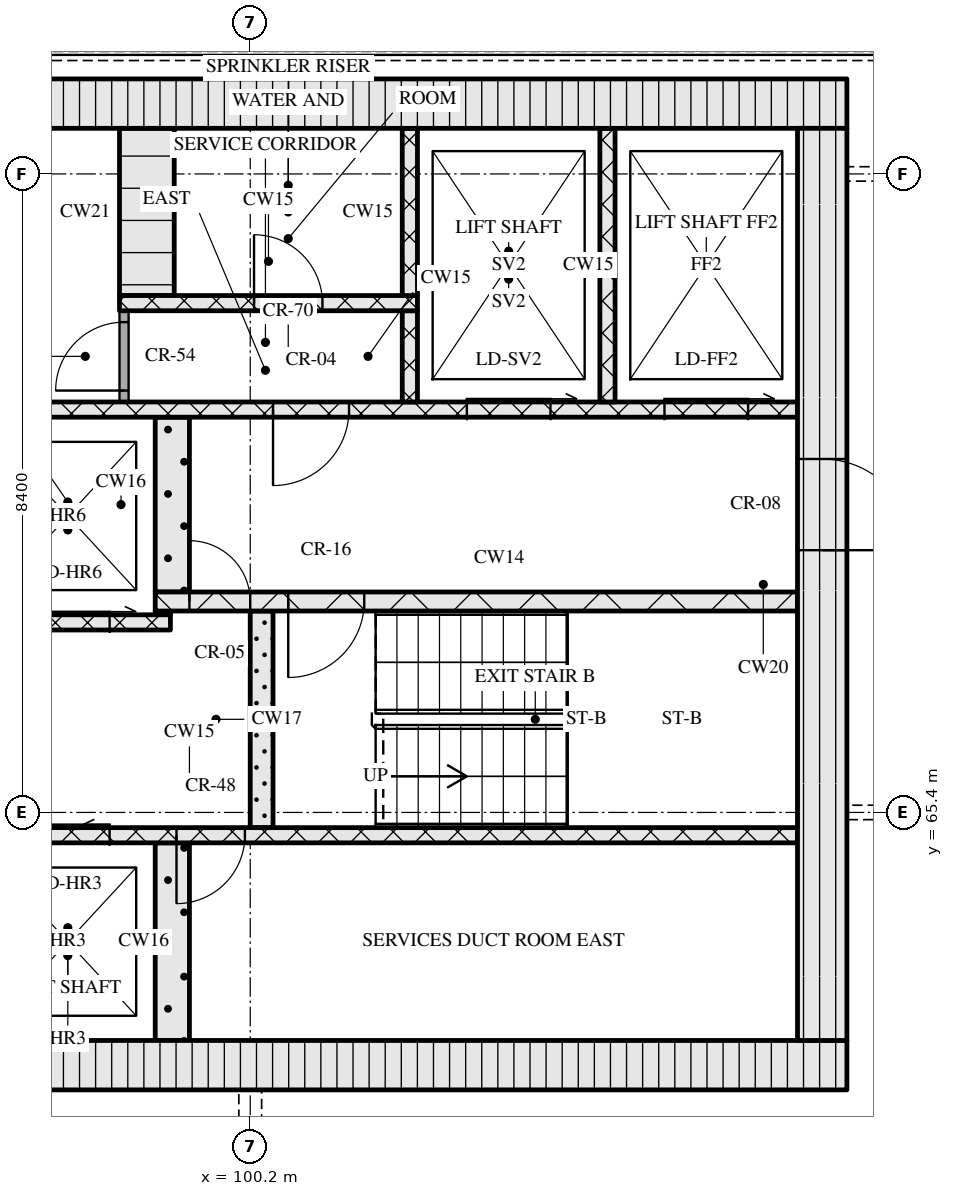
"""IFC4 building model, lengths in metres.
Left out: names, types, materials, properties, quantities, classifications, styles, units other than length and angle.
Written with IfcOpenShell. Run it as: python <this file> out.ifc"""

import sys

from ifc_helpers import new_model, si_unit, direction, frame, frame_2d, origin, place, context, subcontext, project, spatial, rectangle, extrude, element, fill, save


model = new_model("IFC4")
c1 = context("Model", 3, precision=1e-05, world=origin(), true_north=direction((0.0, 1.0)))
c2 = subcontext(c1, "Body", "Model", "MODEL_VIEW")
j1 = project(units=[si_unit("LENGTHUNIT", "METRE"), si_unit("PLANEANGLEUNIT", "RADIAN")], contexts=[c1])
p1 = place(None, origin())
s1 = spatial("IfcSite", under=j1, at=p1, CompositionType="ELEMENT")
p2 = place(p1, origin())
s2 = spatial("IfcBuilding", under=s1, at=p2, CompositionType="ELEMENT")
p3 = place(p2, frame((0.0, 0.0, 245.1)))
s3 = spatial("IfcBuildingStorey", under=s2, at=p3, CompositionType="ELEMENT", Elevation=245.1)
p4 = place(p3, frame((67.15, 62.075, 0.0), z_axis=(0.0, 0.0, 1.0), x_axis=(1.0, 0.0, 0.0)))
e1 = element("IfcWall", 1, at=p4, inside=s3, PredefinedType="SOLIDWALL", context=c2, shape_type="SweptSolid", body=[
    extrude(rectangle(XDim=40.9, YDim=0.65, at=frame_2d((20.45, 0.0))), origin(), (0.0, 0.0, 1.0), 3.32),
])
p5 = place(p4, frame((20.8, 0.0, 0.0)))
e2 = element("IfcOpeningElement", 2, at=p5, cuts=e1, PredefinedType="OPENING", context=c2, shape_type="SweptSolid", body=[
    extrude(rectangle(XDim=1.8, YDim=2.1, at=frame_2d((0.9, 1.05))), frame((0.0, 0.335, 0.0), z_axis=(0.0, -1.0, 0.0), x_axis=(1.0, 0.0, 0.0)), (0.0, 0.0, 1.0), 0.67),
])
p6 = place(p3, frame((67.15, 74.725, 0.0), z_axis=(0.0, 0.0, 1.0), x_axis=(1.0, 0.0, 0.0)))
e3 = element("IfcWall", 3, at=p6, inside=s3, PredefinedType="SOLIDWALL", context=c2, shape_type="SweptSolid", body=[
    extrude(rectangle(XDim=40.9, YDim=0.65, at=frame_2d((20.45, 0.0))), origin(), (0.0, 0.0, 1.0), 3.32),
])
p7 = place(p3, frame((107.725, 62.4, 0.0), z_axis=(0.0, 0.0, 1.0), x_axis=(0.0, 1.0, 0.0)))
e4 = element("IfcWall", 4, at=p7, inside=s3, PredefinedType="SOLIDWALL", context=c2, shape_type="SweptSolid", body=[
    extrude(rectangle(XDim=12.0, YDim=0.65, at=frame_2d((6.0, 0.0))), origin(), (0.0, 0.0, 1.0), 3.32),
])
p8 = place(p7, frame((6.45, 0.0, 0.0)))
e5 = element("IfcOpeningElement", 5, at=p8, cuts=e4, PredefinedType="OPENING", context=c2, shape_type="SweptSolid", body=[
    extrude(rectangle(XDim=1.2, YDim=2.1, at=frame_2d((0.6, 1.05))), frame((0.0, 0.335, 0.0), z_axis=(0.0, -1.0, 0.0), x_axis=(1.0, 0.0, 0.0)), (0.0, 0.0, 1.0), 0.67),
])
p9 = place(p3, frame((99.175, 62.4, 0.0), z_axis=(0.0, 0.0, 1.0), x_axis=(0.0, 1.0, 0.0)))
e6 = element("IfcWall", 6, at=p9, inside=s3, PredefinedType="SOLIDWALL", context=c2, shape_type="SweptSolid", body=[
    extrude(rectangle(XDim=2.6, YDim=0.45, at=frame_2d((1.3, 0.0))), origin(), (0.0, 0.0, 1.0), 3.32),
])
p10 = place(p3, frame((91.4, 65.1, 0.0), z_axis=(0.0, 0.0, 1.0), x_axis=(1.0, 0.0, 0.0)))
e7 = element("IfcWall", 7, at=p10, inside=s3, PredefinedType="SOLIDWALL", context=c2, shape_type="SweptSolid", body=[
    extrude(rectangle(XDim=16.0, YDim=0.2, at=frame_2d((8.0, 0.0))), origin(), (0.0, 0.0, 1.0), 3.32),
])
p11 = place(p10, frame((0.85, 0.0, 0.0)))
e8 = element("IfcOpeningElement", 8, at=p11, cuts=e7, PredefinedType="OPENING", context=c2, shape_type="SweptSolid", body=[
    extrude(rectangle(XDim=1.1, YDim=2.1, at=frame_2d((0.55, 1.05))), frame((0.0, 0.11, 0.0), z_axis=(0.0, -1.0, 0.0), x_axis=(1.0, 0.0, 0.0)), (0.0, 0.0, 1.0), 0.22),
])
p12 = place(p10, frame((3.35, 0.0, 0.0)))
e9 = element("IfcOpeningElement", 9, at=p12, cuts=e7, PredefinedType="OPENING", context=c2, shape_type="SweptSolid", body=[
    extrude(rectangle(XDim=1.1, YDim=2.1, at=frame_2d((0.55, 1.05))), frame((0.0, 0.11, 0.0), z_axis=(0.0, -1.0, 0.0), x_axis=(1.0, 0.0, 0.0)), (0.0, 0.0, 1.0), 0.22),
])
p13 = place(p10, frame((5.85, 0.0, 0.0)))
e10 = element("IfcOpeningElement", 10, at=p13, cuts=e7, PredefinedType="OPENING", context=c2, shape_type="SweptSolid", body=[
    extrude(rectangle(XDim=1.1, YDim=2.1, at=frame_2d((0.55, 1.05))), frame((0.0, 0.11, 0.0), z_axis=(0.0, -1.0, 0.0), x_axis=(1.0, 0.0, 0.0)), (0.0, 0.0, 1.0), 0.22),
])
p14 = place(p10, frame((7.83, 0.0, 0.0)))
e11 = element("IfcOpeningElement", 11, at=p14, cuts=e7, PredefinedType="OPENING", context=c2, shape_type="SweptSolid", body=[
    extrude(rectangle(XDim=0.9, YDim=2.1, at=frame_2d((0.45, 1.05))), frame((0.0, 0.11, 0.0), z_axis=(0.0, -1.0, 0.0), x_axis=(1.0, 0.0, 0.0)), (0.0, 0.0, 1.0), 0.22),
])
p15 = place(p3, frame((100.35, 65.2, 0.0), z_axis=(0.0, 0.0, 1.0), x_axis=(0.0, 1.0, 0.0)))
e12 = element("IfcWall", 12, at=p15, inside=s3, PredefinedType="SOLIDWALL", context=c2, shape_type="SweptSolid", body=[
    extrude(rectangle(XDim=2.85, YDim=0.3, at=frame_2d((1.425, 0.0))), origin(), (0.0, 0.0, 1.0), 3.32),
])
p16 = place(p3, frame((76.05, 67.9, 0.0), z_axis=(0.0, 0.0, 1.0), x_axis=(1.0, 0.0, 0.0)))
e13 = element("IfcWall", 13, at=p16, inside=s3, PredefinedType="SOLIDWALL", context=c2, shape_type="SweptSolid", body=[
    extrude(rectangle(XDim=23.1, YDim=0.2, at=frame_2d((11.55, 0.0))), origin(), (0.0, 0.0, 1.0), 3.32),
])
p17 = place(p16, frame((0.75, 0.0, 0.0)))
e14 = element("IfcOpeningElement", 14, at=p17, cuts=e13, PredefinedType="OPENING", context=c2, shape_type="SweptSolid", body=[
    extrude(rectangle(XDim=0.9, YDim=2.1, at=frame_2d((0.45, 1.05))), frame((0.0, 0.11, 0.0), z_axis=(0.0, -1.0, 0.0), x_axis=(1.0, 0.0, 0.0)), (0.0, 0.0, 1.0), 0.22),
])
p18 = place(p16, frame((3.32, 0.0, 0.0)))
e15 = element("IfcOpeningElement", 15, at=p18, cuts=e13, PredefinedType="OPENING", context=c2, shape_type="SweptSolid", body=[
    extrude(rectangle(XDim=0.9, YDim=2.1, at=frame_2d((0.45, 1.05))), frame((0.0, 0.11, 0.0), z_axis=(0.0, -1.0, 0.0), x_axis=(1.0, 0.0, 0.0)), (0.0, 0.0, 1.0), 0.22),
])
p19 = place(p16, frame((5.77, 0.0, 0.0)))
e16 = element("IfcOpeningElement", 16, at=p19, cuts=e13, PredefinedType="OPENING", context=c2, shape_type="SweptSolid", body=[
    extrude(rectangle(XDim=0.9, YDim=2.1, at=frame_2d((0.45, 1.05))), frame((0.0, 0.11, 0.0), z_axis=(0.0, -1.0, 0.0), x_axis=(1.0, 0.0, 0.0)), (0.0, 0.0, 1.0), 0.22),
])
p20 = place(p16, frame((8.45, 0.0, 0.0)))
e17 = element("IfcOpeningElement", 17, at=p20, cuts=e13, PredefinedType="OPENING", context=c2, shape_type="SweptSolid", body=[
    extrude(rectangle(XDim=0.9, YDim=2.1, at=frame_2d((0.45, 1.05))), frame((0.0, 0.11, 0.0), z_axis=(0.0, -1.0, 0.0), x_axis=(1.0, 0.0, 0.0)), (0.0, 0.0, 1.0), 0.22),
])
p21 = place(p16, frame((10.91, 0.0, 0.0)))
e18 = element("IfcOpeningElement", 18, at=p21, cuts=e13, PredefinedType="OPENING", context=c2, shape_type="SweptSolid", body=[
    extrude(rectangle(XDim=0.9, YDim=2.1, at=frame_2d((0.45, 1.05))), frame((0.0, 0.11, 0.0), z_axis=(0.0, -1.0, 0.0), x_axis=(1.0, 0.0, 0.0)), (0.0, 0.0, 1.0), 0.22),
])
p22 = place(p16, frame((13.55, 0.0, 0.0)))
e19 = element("IfcOpeningElement", 19, at=p22, cuts=e13, PredefinedType="OPENING", context=c2, shape_type="SweptSolid", body=[
    extrude(rectangle(XDim=1.0, YDim=2.1, at=frame_2d((0.5, 1.05))), frame((0.0, 0.11, 0.0), z_axis=(0.0, -1.0, 0.0), x_axis=(1.0, 0.0, 0.0)), (0.0, 0.0, 1.0), 0.22),
])
p23 = place(p16, frame((16.2, 0.0, 0.0)))
e20 = element("IfcOpeningElement", 20, at=p23, cuts=e13, PredefinedType="OPENING", context=c2, shape_type="SweptSolid", body=[
    extrude(rectangle(XDim=1.1, YDim=2.1, at=frame_2d((0.55, 1.05))), frame((0.0, 0.11, 0.0), z_axis=(0.0, -1.0, 0.0), x_axis=(1.0, 0.0, 0.0)), (0.0, 0.0, 1.0), 0.22),
])
p24 = place(p16, frame((18.7, 0.0, 0.0)))
e21 = element("IfcOpeningElement", 21, at=p24, cuts=e13, PredefinedType="OPENING", context=c2, shape_type="SweptSolid", body=[
    extrude(rectangle(XDim=1.1, YDim=2.1, at=frame_2d((0.55, 1.05))), frame((0.0, 0.11, 0.0), z_axis=(0.0, -1.0, 0.0), x_axis=(1.0, 0.0, 0.0)), (0.0, 0.0, 1.0), 0.22),
])
p25 = place(p16, frame((21.2, 0.0, 0.0)))
e22 = element("IfcOpeningElement", 22, at=p25, cuts=e13, PredefinedType="OPENING", context=c2, shape_type="SweptSolid", body=[
    extrude(rectangle(XDim=1.1, YDim=2.1, at=frame_2d((0.55, 1.05))), frame((0.0, 0.11, 0.0), z_axis=(0.0, -1.0, 0.0), x_axis=(1.0, 0.0, 0.0)), (0.0, 0.0, 1.0), 0.22),
])
p26 = place(p3, frame((98.95, 68.025, 0.0), z_axis=(0.0, 0.0, 1.0), x_axis=(1.0, 0.0, 0.0)))
e23 = element("IfcWall", 23, at=p26, inside=s3, PredefinedType="SOLIDWALL", context=c2, shape_type="SweptSolid", body=[
    extrude(rectangle(XDim=0.2, YDim=0.05, at=frame_2d((0.1, 0.0))), origin(), (0.0, 0.0, 1.0), 3.32),
])
p27 = place(p3, frame((98.95, 68.175, 0.0), z_axis=(0.0, 0.0, 1.0), x_axis=(1.0, 0.0, 0.0)))
e24 = element("IfcWall", 24, at=p27, inside=s3, PredefinedType="SOLIDWALL", context=c2, shape_type="SweptSolid", body=[
    extrude(rectangle(XDim=8.45, YDim=0.25, at=frame_2d((4.225, 0.0))), origin(), (0.0, 0.0, 1.0), 3.32),
])
p28 = place(p27, frame((0.45, 0.0, 0.0)))
e25 = element("IfcOpeningElement", 25, at=p28, cuts=e24, PredefinedType="OPENING", context=c2, shape_type="SweptSolid", body=[
    extrude(rectangle(XDim=0.8, YDim=2.1, at=frame_2d((0.4, 1.05))), frame((0.0, 0.135, 0.0), z_axis=(0.0, -1.0, 0.0), x_axis=(1.0, 0.0, 0.0)), (0.0, 0.0, 1.0), 0.27),
])
p29 = place(p27, frame((1.75, 0.0, 0.0)))
e26 = element("IfcOpeningElement", 26, at=p29, cuts=e24, PredefinedType="OPENING", context=c2, shape_type="SweptSolid", body=[
    extrude(rectangle(XDim=1.0, YDim=2.1, at=frame_2d((0.5, 1.05))), frame((0.0, 0.135, 0.0), z_axis=(0.0, -1.0, 0.0), x_axis=(1.0, 0.0, 0.0)), (0.0, 0.0, 1.0), 0.27),
])
p30 = place(p3, frame((99.175, 68.3, 0.0), z_axis=(0.0, 0.0, 1.0), x_axis=(0.0, 1.0, 0.0)))
e27 = element("IfcWall", 27, at=p30, inside=s3, PredefinedType="SOLIDWALL", context=c2, shape_type="SweptSolid", body=[
    extrude(rectangle(XDim=2.3, YDim=0.45, at=frame_2d((1.15, 0.0))), origin(), (0.0, 0.0, 1.0), 3.32),
])
p31 = place(p3, frame((67.8, 70.7, 0.0), z_axis=(0.0, 0.0, 1.0), x_axis=(1.0, 0.0, 0.0)))
e28 = element("IfcWall", 28, at=p31, inside=s3, PredefinedType="SOLIDWALL", context=c2, shape_type="SweptSolid", body=[
    extrude(rectangle(XDim=39.6, YDim=0.2, at=frame_2d((19.8, 0.0))), origin(), (0.0, 0.0, 1.0), 3.32),
])
p32 = place(p31, frame((0.65, 0.0, 0.0)))
e29 = element("IfcOpeningElement", 29, at=p32, cuts=e28, PredefinedType="OPENING", context=c2, shape_type="SweptSolid", body=[
    extrude(rectangle(XDim=1.1, YDim=2.1, at=frame_2d((0.55, 1.05))), frame((0.0, 0.11, 0.0), z_axis=(0.0, -1.0, 0.0), x_axis=(1.0, 0.0, 0.0)), (0.0, 0.0, 1.0), 0.22),
])
p33 = place(p31, frame((3.25, 0.0, 0.0)))
e30 = element("IfcOpeningElement", 30, at=p33, cuts=e28, PredefinedType="OPENING", context=c2, shape_type="SweptSolid", body=[
    extrude(rectangle(XDim=1.1, YDim=2.1, at=frame_2d((0.55, 1.05))), frame((0.0, 0.11, 0.0), z_axis=(0.0, -1.0, 0.0), x_axis=(1.0, 0.0, 0.0)), (0.0, 0.0, 1.0), 0.22),
])
p34 = place(p31, frame((5.9, 0.0, 0.0)))
e31 = element("IfcOpeningElement", 31, at=p34, cuts=e28, PredefinedType="OPENING", context=c2, shape_type="SweptSolid", body=[
    extrude(rectangle(XDim=1.0, YDim=2.1, at=frame_2d((0.5, 1.05))), frame((0.0, 0.11, 0.0), z_axis=(0.0, -1.0, 0.0), x_axis=(1.0, 0.0, 0.0)), (0.0, 0.0, 1.0), 0.22),
])
p35 = place(p31, frame((21.7, 0.0, 0.0)))
e32 = element("IfcOpeningElement", 32, at=p35, cuts=e28, PredefinedType="OPENING", context=c2, shape_type="SweptSolid", body=[
    extrude(rectangle(XDim=1.0, YDim=2.1, at=frame_2d((0.5, 1.05))), frame((0.0, 0.11, 0.0), z_axis=(0.0, -1.0, 0.0), x_axis=(1.0, 0.0, 0.0)), (0.0, 0.0, 1.0), 0.22),
])
p36 = place(p31, frame((32.7, 0.0, 0.0)))
e33 = element("IfcOpeningElement", 33, at=p36, cuts=e28, PredefinedType="OPENING", context=c2, shape_type="SweptSolid", body=[
    extrude(rectangle(XDim=1.0, YDim=2.1, at=frame_2d((0.5, 1.05))), frame((0.0, 0.11, 0.0), z_axis=(0.0, -1.0, 0.0), x_axis=(1.0, 0.0, 0.0)), (0.0, 0.0, 1.0), 0.22),
])
p37 = place(p31, frame((35.25, 0.0, 0.0)))
e34 = element("IfcOpeningElement", 34, at=p37, cuts=e28, PredefinedType="OPENING", context=c2, shape_type="SweptSolid", body=[
    extrude(rectangle(XDim=1.1, YDim=2.1, at=frame_2d((0.55, 1.05))), frame((0.0, 0.11, 0.0), z_axis=(0.0, -1.0, 0.0), x_axis=(1.0, 0.0, 0.0)), (0.0, 0.0, 1.0), 0.22),
])
p38 = place(p31, frame((37.85, 0.0, 0.0)))
e35 = element("IfcOpeningElement", 35, at=p38, cuts=e28, PredefinedType="OPENING", context=c2, shape_type="SweptSolid", body=[
    extrude(rectangle(XDim=1.1, YDim=2.1, at=frame_2d((0.55, 1.05))), frame((0.0, 0.11, 0.0), z_axis=(0.0, -1.0, 0.0), x_axis=(1.0, 0.0, 0.0)), (0.0, 0.0, 1.0), 0.22),
])
p39 = place(p3, frame((98.54, 70.8, 0.0), z_axis=(0.0, 0.0, 1.0), x_axis=(0.0, 1.0, 0.0)))
e36 = element("IfcWall", 36, at=p39, inside=s3, PredefinedType="PARTITIONING", context=c2, shape_type="SweptSolid", body=[
    extrude(rectangle(XDim=1.2, YDim=0.12, at=frame_2d((0.6, 0.0))), origin(), (0.0, 0.0, 1.0), 3.32),
])
p40 = place(p39, frame((0.15, 0.0, 0.0)))
e37 = element("IfcOpeningElement", 37, at=p40, cuts=e36, PredefinedType="OPENING", context=c2, shape_type="SweptSolid", body=[
    extrude(rectangle(XDim=0.9, YDim=2.1, at=frame_2d((0.45, 1.05))), frame((0.0, 0.07, 0.0), z_axis=(0.0, -1.0, 0.0), x_axis=(1.0, 0.0, 0.0)), (0.0, 0.0, 1.0), 0.14),
])
p41 = place(p3, frame((102.3, 70.8, 0.0), z_axis=(0.0, 0.0, 1.0), x_axis=(0.0, 1.0, 0.0)))
e38 = element("IfcWall", 38, at=p41, inside=s3, PredefinedType="SOLIDWALL", context=c2, shape_type="SweptSolid", body=[
    extrude(rectangle(XDim=1.2, YDim=0.2, at=frame_2d((0.6, 0.0))), origin(), (0.0, 0.0, 1.0), 3.32),
])
p42 = place(p3, frame((104.9, 70.8, 0.0), z_axis=(0.0, 0.0, 1.0), x_axis=(0.0, 1.0, 0.0)))
e39 = element("IfcWall", 39, at=p42, inside=s3, PredefinedType="SOLIDWALL", context=c2, shape_type="SweptSolid", body=[
    extrude(rectangle(XDim=3.6, YDim=0.2, at=frame_2d((1.8, 0.0))), origin(), (0.0, 0.0, 1.0), 3.32),
])
p43 = place(p3, frame((98.48, 72.1, 0.0), z_axis=(0.0, 0.0, 1.0), x_axis=(1.0, 0.0, 0.0)))
e40 = element("IfcWall", 40, at=p43, inside=s3, PredefinedType="SOLIDWALL", context=c2, shape_type="SweptSolid", body=[
    extrude(rectangle(XDim=3.92, YDim=0.2, at=frame_2d((1.96, 0.0))), origin(), (0.0, 0.0, 1.0), 3.32),
])
p44 = place(p43, frame((1.77, 0.0, 0.0)))
e41 = element("IfcOpeningElement", 41, at=p44, cuts=e40, PredefinedType="OPENING", context=c2, shape_type="SweptSolid", body=[
    extrude(rectangle(XDim=0.9, YDim=2.1, at=frame_2d((0.45, 1.05))), frame((0.0, 0.11, 0.0), z_axis=(0.0, -1.0, 0.0), x_axis=(1.0, 0.0, 0.0)), (0.0, 0.0, 1.0), 0.22),
])
p45 = place(p3, frame((98.84, 72.2, 0.0), z_axis=(0.0, 0.0, 1.0), x_axis=(0.0, 1.0, 0.0)))
e42 = element("IfcWall", 42, at=p45, inside=s3, PredefinedType="SOLIDWALL", context=c2, shape_type="SweptSolid", body=[
    extrude(rectangle(XDim=2.2, YDim=0.72, at=frame_2d((1.1, 0.0))), origin(), (0.0, 0.0, 1.0), 3.32),
])
p46 = place(p3, frame((102.3, 72.2, 0.0), z_axis=(0.0, 0.0, 1.0), x_axis=(0.0, 1.0, 0.0)))
e43 = element("IfcWall", 43, at=p46, inside=s3, PredefinedType="SOLIDWALL", context=c2, shape_type="SweptSolid", body=[
    extrude(rectangle(XDim=2.2, YDim=0.2, at=frame_2d((1.1, 0.0))), origin(), (0.0, 0.0, 1.0), 3.32),
])
p47 = place(p13, origin())
e44 = element("IfcDoor", 44, at=p47, inside=s3, OperationType="SLIDING_TO_LEFT", PredefinedType="DOOR", context=c2, shape_type="SweptSolid", body=[
    extrude(rectangle(XDim=1.1, YDim=2.1, at=frame_2d((0.55, 1.05))), frame((0.0, 0.025, 0.0), z_axis=(0.0, -1.0, 0.0), x_axis=(1.0, 0.0, 0.0)), (0.0, 0.0, 1.0), 0.05),
])
fill(e10, e44)
p48 = place(p14, origin())
e45 = element("IfcDoor", 45, at=p48, inside=s3, OperationType="SINGLE_SWING_RIGHT", PredefinedType="DOOR", context=c2, shape_type="SweptSolid", body=[
    extrude(rectangle(XDim=0.9, YDim=2.1, at=frame_2d((0.45, 1.05))), frame((0.0, 0.025, 0.0), z_axis=(0.0, -1.0, 0.0), x_axis=(1.0, 0.0, 0.0)), (0.0, 0.0, 1.0), 0.05),
])
fill(e11, e45)
p49 = place(p25, origin())
e46 = element("IfcDoor", 46, at=p49, inside=s3, OperationType="SLIDING_TO_RIGHT", PredefinedType="DOOR", context=c2, shape_type="SweptSolid", body=[
    extrude(rectangle(XDim=1.1, YDim=2.1, at=frame_2d((0.55, 1.05))), frame((0.0, 0.025, 0.0), z_axis=(0.0, -1.0, 0.0), x_axis=(1.0, 0.0, 0.0)), (0.0, 0.0, 1.0), 0.05),
])
fill(e22, e46)
p50 = place(p28, origin())
e47 = element("IfcDoor", 47, at=p50, inside=s3, OperationType="SINGLE_SWING_LEFT", PredefinedType="DOOR", context=c2, shape_type="SweptSolid", body=[
    extrude(rectangle(XDim=0.8, YDim=2.1, at=frame_2d((0.4, 1.05))), frame((0.0, 0.025, 0.0), z_axis=(0.0, -1.0, 0.0), x_axis=(1.0, 0.0, 0.0)), (0.0, 0.0, 1.0), 0.05),
])
fill(e25, e47)
p51 = place(p29, origin())
e48 = element("IfcDoor", 48, at=p51, inside=s3, OperationType="SINGLE_SWING_RIGHT", PredefinedType="DOOR", context=c2, shape_type="SweptSolid", body=[
    extrude(rectangle(XDim=1.0, YDim=2.1, at=frame_2d((0.5, 1.05))), frame((0.0, 0.025, 0.0), z_axis=(0.0, -1.0, 0.0), x_axis=(1.0, 0.0, 0.0)), (0.0, 0.0, 1.0), 0.05),
])
fill(e26, e48)
p52 = place(p8, origin())
e49 = element("IfcDoor", 49, at=p52, inside=s3, OperationType="SINGLE_SWING_RIGHT", PredefinedType="DOOR", context=c2, shape_type="SweptSolid", body=[
    extrude(rectangle(XDim=1.2, YDim=2.1, at=frame_2d((0.6, 1.05))), frame((0.0, 0.025, 0.0), z_axis=(0.0, -1.0, 0.0), x_axis=(1.0, 0.0, 0.0)), (0.0, 0.0, 1.0), 0.05),
])
fill(e5, e49)
p53 = place(p36, origin())
e50 = element("IfcDoor", 50, at=p53, inside=s3, OperationType="SINGLE_SWING_RIGHT", PredefinedType="DOOR", context=c2, shape_type="SweptSolid", body=[
    extrude(rectangle(XDim=1.0, YDim=2.1, at=frame_2d((0.5, 1.05))), frame((0.0, 0.025, 0.0), z_axis=(0.0, -1.0, 0.0), x_axis=(1.0, 0.0, 0.0)), (0.0, 0.0, 1.0), 0.05),
])
fill(e33, e50)
p54 = place(p37, origin())
e51 = element("IfcDoor", 51, at=p54, inside=s3, OperationType="SLIDING_TO_RIGHT", PredefinedType="DOOR", context=c2, shape_type="SweptSolid", body=[
    extrude(rectangle(XDim=1.1, YDim=2.1, at=frame_2d((0.55, 1.05))), frame((0.0, 0.025, 0.0), z_axis=(0.0, -1.0, 0.0), x_axis=(1.0, 0.0, 0.0)), (0.0, 0.0, 1.0), 0.05),
])
fill(e34, e51)
p55 = place(p38, origin())
e52 = element("IfcDoor", 52, at=p55, inside=s3, OperationType="SLIDING_TO_RIGHT", PredefinedType="DOOR", context=c2, shape_type="SweptSolid", body=[
    extrude(rectangle(XDim=1.1, YDim=2.1, at=frame_2d((0.55, 1.05))), frame((0.0, 0.025, 0.0), z_axis=(0.0, -1.0, 0.0), x_axis=(1.0, 0.0, 0.0)), (0.0, 0.0, 1.0), 0.05),
])
fill(e35, e52)
p56 = place(p40, origin())
e53 = element("IfcDoor", 53, at=p56, inside=s3, OperationType="SINGLE_SWING_LEFT", PredefinedType="DOOR", context=c2, shape_type="SweptSolid", body=[
    extrude(rectangle(XDim=0.9, YDim=2.1, at=frame_2d((0.45, 1.05))), frame((0.0, 0.025, 0.0), z_axis=(0.0, -1.0, 0.0), x_axis=(1.0, 0.0, 0.0)), (0.0, 0.0, 1.0), 0.05),
])
fill(e37, e53)
p57 = place(p44, origin())
e54 = element("IfcDoor", 54, at=p57, inside=s3, OperationType="SINGLE_SWING_LEFT", PredefinedType="DOOR", context=c2, shape_type="SweptSolid", body=[
    extrude(rectangle(XDim=0.9, YDim=2.1, at=frame_2d((0.45, 1.05))), frame((0.0, 0.025, 0.0), z_axis=(0.0, -1.0, 0.0), x_axis=(1.0, 0.0, 0.0)), (0.0, 0.0, 1.0), 0.05),
])
fill(e41, e54)
save(model, sys.argv[1])
